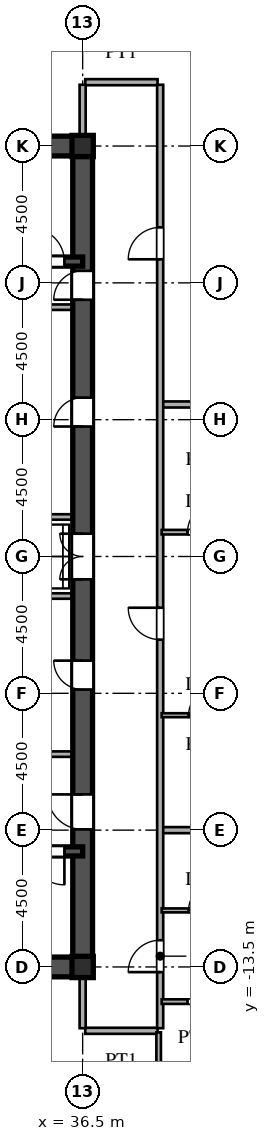
"""IFC4 building model, lengths in metres.
Left out: names, types, materials, properties, quantities, classifications, styles, units other than length and angle.
Written with IfcOpenShell. Run it as: python <this file> out.ifc"""

import sys

from ifc_helpers import new_model, si_unit, direction, frame, frame_2d, origin, origin_2d, place, context, subcontext, project, spatial, rectangle, i_section, extrude, source, transform, mapped, element, fill, save


model = new_model("IFC4")
c1 = context("Model", 3, precision=1e-05, world=origin(), true_north=direction((0.0, 1.0)))
c2 = subcontext(c1, "Body", "Model", "MODEL_VIEW")
j1 = project(units=[si_unit("LENGTHUNIT", "METRE"), si_unit("PLANEANGLEUNIT", "RADIAN")], contexts=[c1])
p1 = place(None, origin())
s1 = spatial("IfcSite", under=j1, at=p1, CompositionType="ELEMENT")
p2 = place(p1, origin())
s2 = spatial("IfcBuilding", under=s1, at=p2, CompositionType="ELEMENT")
p3 = place(p2, frame((0.0, 0.0, 132.0)))
s3 = spatial("IfcBuildingStorey", under=s2, at=p3, CompositionType="ELEMENT", Elevation=132.0)
m1 = source(origin(), c2, "Body", "SweptSolid", [
    extrude(i_section(OverallWidth=0.7, OverallDepth=0.7, WebThickness=0.028, FlangeThickness=0.045, at=origin_2d()), origin(), (0.0, 0.0, 1.0), 3.6),
])
for number, where, z_axis, x_axis in (
    (1, (36.5, -13.5, 0.0), (0.0, 0.0, 1.0), (1.0, 0.0, 0.0)),
    (2, (36.5, 13.5, 0.0), (0.0, 0.0, 1.0), (1.0, 0.0, 0.0)),
):
    element("IfcColumn", number, at=place(p3, frame(where, z_axis=z_axis, x_axis=x_axis)), inside=s3, PredefinedType="COLUMN", context=c2, shape_type="MappedRepresentation", body=[
        mapped(m1, transform((0.0, 0.0, 0.0), scale=1.0)),
    ])
for number, where, z_axis, x_axis in (
    (3, (27.5, -13.5, 0.0), (0.0, 0.0, 1.0), (1.0, 0.0, 0.0)),
    (4, (27.5, 13.5, 0.0), (0.0, 0.0, 1.0), (1.0, 0.0, 0.0)),
):
    element("IfcWall", number, at=place(p3, frame(where, z_axis=z_axis, x_axis=x_axis)), inside=s3, PredefinedType="SHEAR", context=c2, shape_type="SweptSolid", body=[
        extrude(rectangle(XDim=9.0, YDim=0.65, at=frame_2d((4.5, 0.0))), origin(), (0.0, 0.0, 1.0), 3.34),
    ])
p4 = place(p3, frame((36.5, -13.65, 0.0), z_axis=(0.0, 0.0, 1.0), x_axis=(0.0, 1.0, 0.0)))
e5 = element("IfcWall", 5, at=p4, inside=s3, PredefinedType="SHEAR", context=c2, shape_type="SweptSolid", body=[
    extrude(rectangle(XDim=7.15, YDim=0.65, at=frame_2d((3.575, 0.0))), origin(), (0.0, 0.0, 1.0), 3.34),
])
p5 = place(p4, frame((4.675, 0.0, 0.0)))
e6 = element("IfcOpeningElement", 6, at=p5, cuts=e5, PredefinedType="OPENING", context=c2, shape_type="SweptSolid", body=[
    extrude(rectangle(XDim=1.15, YDim=2.2, at=frame_2d((0.575, 1.1))), frame((0.0, 0.335, 0.0), z_axis=(0.0, -1.0, 0.0), x_axis=(1.0, 0.0, 0.0)), (0.0, 0.0, 1.0), 0.67),
])
p6 = place(p3, frame((36.5, -1.3, 0.0), z_axis=(0.0, 0.0, 1.0), x_axis=(0.0, 1.0, 0.0)))
e7 = element("IfcWall", 7, at=p6, inside=s3, PredefinedType="SHEAR", context=c2, shape_type="SweptSolid", body=[
    extrude(rectangle(XDim=2.6, YDim=0.65, at=frame_2d((1.3, 0.0))), origin(), (0.0, 0.0, 1.0), 3.34),
])
p7 = place(p6, frame((0.55, 0.0, 0.0)))
e8 = element("IfcOpeningElement", 8, at=p7, cuts=e7, PredefinedType="OPENING", context=c2, shape_type="SweptSolid", body=[
    extrude(rectangle(XDim=1.5, YDim=2.3, at=frame_2d((0.75, 1.15))), frame((0.0, 0.335, 0.0), z_axis=(0.0, -1.0, 0.0), x_axis=(1.0, 0.0, 0.0)), (0.0, 0.0, 1.0), 0.67),
])
p8 = place(p3, frame((36.5, 8.2, 0.0), z_axis=(0.0, 0.0, 1.0), x_axis=(0.0, 1.0, 0.0)))
e9 = element("IfcWall", 9, at=p8, inside=s3, PredefinedType="SHEAR", context=c2, shape_type="SweptSolid", body=[
    extrude(rectangle(XDim=5.45, YDim=0.65, at=frame_2d((2.725, 0.0))), origin(), (0.0, 0.0, 1.0), 3.34),
])
p9 = place(p8, frame((0.245, 0.0, 0.0)))
e10 = element("IfcOpeningElement", 10, at=p9, cuts=e9, PredefinedType="OPENING", context=c2, shape_type="SweptSolid", body=[
    extrude(rectangle(XDim=0.95, YDim=2.15, at=frame_2d((0.475, 1.075))), frame((0.0, 0.335, 0.0), z_axis=(0.0, -1.0, 0.0), x_axis=(1.0, 0.0, 0.0)), (0.0, 0.0, 1.0), 0.67),
])
p10 = place(p3, frame((36.5, -6.5, 0.0), z_axis=(0.0, 0.0, 1.0), x_axis=(0.0, 1.0, 0.0)))
e11 = element("IfcWall", 11, at=p10, inside=s3, PredefinedType="SHEAR", context=c2, shape_type="SweptSolid", body=[
    extrude(rectangle(XDim=5.2, YDim=0.65, at=frame_2d((2.6, 0.0))), origin(), (0.0, 0.0, 1.0), 3.34),
])
p11 = place(p10, frame((2.125, 0.0, 0.0)))
e12 = element("IfcOpeningElement", 12, at=p11, cuts=e11, PredefinedType="OPENING", context=c2, shape_type="SweptSolid", body=[
    extrude(rectangle(XDim=0.95, YDim=2.15, at=frame_2d((0.475, 1.075))), frame((0.0, 0.335, 0.0), z_axis=(0.0, -1.0, 0.0), x_axis=(1.0, 0.0, 0.0)), (0.0, 0.0, 1.0), 0.67),
])
p12 = place(p3, frame((36.5, 1.3, 0.0), z_axis=(0.0, 0.0, 1.0), x_axis=(0.0, 1.0, 0.0)))
e13 = element("IfcWall", 13, at=p12, inside=s3, PredefinedType="SHEAR", context=c2, shape_type="SweptSolid", body=[
    extrude(rectangle(XDim=6.9, YDim=0.65, at=frame_2d((3.45, 0.0))), origin(), (0.0, 0.0, 1.0), 3.34),
])
p13 = place(p12, frame((2.975, 0.0, 0.0)))
e14 = element("IfcOpeningElement", 14, at=p13, cuts=e13, PredefinedType="OPENING", context=c2, shape_type="SweptSolid", body=[
    extrude(rectangle(XDim=0.95, YDim=2.15, at=frame_2d((0.475, 1.075))), frame((0.0, 0.335, 0.0), z_axis=(0.0, -1.0, 0.0), x_axis=(1.0, 0.0, 0.0)), (0.0, 0.0, 1.0), 0.67),
])
p14 = place(p3, frame((27.5, -9.7, 0.0), z_axis=(0.0, 0.0, 1.0), x_axis=(1.0, 0.0, 0.0)))
e15 = element("IfcWall", 15, at=p14, inside=s3, PredefinedType="SHEAR", context=c2, shape_type="SweptSolid", body=[
    extrude(rectangle(XDim=9.0, YDim=0.3, at=frame_2d((4.5, 0.0))), origin(), (0.0, 0.0, 1.0), 3.34),
])
p15 = place(p14, frame((7.3, 0.0, 0.0)))
e16 = element("IfcOpeningElement", 16, at=p15, cuts=e15, PredefinedType="OPENING", context=c2, shape_type="SweptSolid", body=[
    extrude(rectangle(XDim=1.1, YDim=2.2, at=frame_2d((0.55, 1.1))), frame((0.0, 0.16, 0.0), z_axis=(0.0, -1.0, 0.0), x_axis=(1.0, 0.0, 0.0)), (0.0, 0.0, 1.0), 0.32),
])
p16 = place(p3, frame((27.5, 9.7, 0.0), z_axis=(0.0, 0.0, 1.0), x_axis=(1.0, 0.0, 0.0)))
e17 = element("IfcWall", 17, at=p16, inside=s3, PredefinedType="SHEAR", context=c2, shape_type="SweptSolid", body=[
    extrude(rectangle(XDim=9.0, YDim=0.3, at=frame_2d((4.5, 0.0))), origin(), (0.0, 0.0, 1.0), 3.34),
])
p17 = place(p16, frame((7.3, 0.0, 0.0)))
e18 = element("IfcOpeningElement", 18, at=p17, cuts=e17, PredefinedType="OPENING", context=c2, shape_type="SweptSolid", body=[
    extrude(rectangle(XDim=1.1, YDim=2.2, at=frame_2d((0.55, 1.1))), frame((0.0, 0.16, 0.0), z_axis=(0.0, -1.0, 0.0), x_axis=(1.0, 0.0, 0.0)), (0.0, 0.0, 1.0), 0.32),
])
for number, where, z_axis, x_axis in (
    (19, (30.45, -6.5, 0.0), (0.0, 0.0, 1.0), (1.0, 0.0, 0.0)),
    (20, (30.45, 8.2, 0.0), (0.0, 0.0, 1.0), (1.0, 0.0, 0.0)),
):
    element("IfcWall", number, at=place(p3, frame(where, z_axis=z_axis, x_axis=x_axis)), inside=s3, PredefinedType="PARTITIONING", context=c2, shape_type="SweptSolid", body=[
        extrude(rectangle(XDim=5.7, YDim=0.18, at=frame_2d((2.85, 0.0))), origin(), (0.0, 0.0, 1.0), 3.34),
    ])
for number, where, z_axis, x_axis in (
    (21, (33.2, -1.3, 0.0), (0.0, 0.0, 1.0), (1.0, 0.0, 0.0)),
    (22, (33.2, 1.3, 0.0), (0.0, 0.0, 1.0), (1.0, 0.0, 0.0)),
):
    element("IfcWall", number, at=place(p3, frame(where, z_axis=z_axis, x_axis=x_axis)), inside=s3, PredefinedType="PARTITIONING", context=c2, shape_type="SweptSolid", body=[
        extrude(rectangle(XDim=2.95, YDim=0.18, at=frame_2d((1.475, 0.0))), origin(), (0.0, 0.0, 1.0), 3.34),
    ])
p18 = place(p3, frame((36.585, -15.6, 0.0), z_axis=(0.0, 0.0, 1.0), x_axis=(1.0, 0.0, 0.0)))
e23 = element("IfcWall", 23, at=p18, inside=s3, PredefinedType="PARTITIONING", context=c2, shape_type="SweptSolid", body=[
    extrude(rectangle(XDim=2.38, YDim=0.2, at=frame_2d((1.19, 0.0))), origin(), (0.0, 0.0, 1.0), 3.34),
])
p19 = place(p3, frame((39.1, -14.64, 0.0), z_axis=(0.0, 0.0, 1.0), x_axis=(1.0, 0.0, 0.0)))
e24 = element("IfcWall", 24, at=p19, inside=s3, PredefinedType="PARTITIONING", context=c2, shape_type="SweptSolid", body=[
    extrude(rectangle(XDim=2.65, YDim=0.15, at=frame_2d((1.325, 0.0))), origin(), (0.0, 0.0, 1.0), 3.34),
])
p20 = place(p19, frame((0.85, 0.0, 0.0)))
e25 = element("IfcOpeningElement", 25, at=p20, cuts=e24, PredefinedType="OPENING", context=c2, shape_type="SweptSolid", body=[
    extrude(rectangle(XDim=0.95, YDim=2.15, at=frame_2d((0.475, 1.075))), frame((0.0, 0.085, 0.0), z_axis=(0.0, -1.0, 0.0), x_axis=(1.0, 0.0, 0.0)), (0.0, 0.0, 1.0), 0.17),
])
p21 = place(p3, frame((39.1, -11.64, 0.0), z_axis=(0.0, 0.0, 1.0), x_axis=(1.0, 0.0, 0.0)))
e26 = element("IfcWall", 26, at=p21, inside=s3, PredefinedType="PARTITIONING", context=c2, shape_type="SweptSolid", body=[
    extrude(rectangle(XDim=2.65, YDim=0.13, at=frame_2d((1.325, 0.0))), origin(), (0.0, 0.0, 1.0), 3.34),
])
p22 = place(p21, frame((0.885, 0.0, 0.0)))
e27 = element("IfcOpeningElement", 27, at=p22, cuts=e26, PredefinedType="OPENING", context=c2, shape_type="SweptSolid", body=[
    extrude(rectangle(XDim=0.88, YDim=2.1, at=frame_2d((0.44, 1.05))), frame((0.0, 0.075, 0.0), z_axis=(0.0, -1.0, 0.0), x_axis=(1.0, 0.0, 0.0)), (0.0, 0.0, 1.0), 0.15),
])
p23 = place(p3, frame((39.13, -9.0, 0.0), z_axis=(0.0, 0.0, 1.0), x_axis=(1.0, 0.0, 0.0)))
e28 = element("IfcWall", 28, at=p23, inside=s3, PredefinedType="PARTITIONING", context=c2, shape_type="SweptSolid", body=[
    extrude(rectangle(XDim=22.586, YDim=0.2, at=frame_2d((11.293, 0.0))), origin(), (0.0, 0.0, 1.0), 3.34),
])
p24 = place(p3, frame((39.1, -5.22, 0.0), z_axis=(0.0, 0.0, 1.0), x_axis=(1.0, 0.0, 0.0)))
e29 = element("IfcWall", 29, at=p24, inside=s3, PredefinedType="PARTITIONING", context=c2, shape_type="SweptSolid", body=[
    extrude(rectangle(XDim=2.65, YDim=0.13, at=frame_2d((1.325, 0.0))), origin(), (0.0, 0.0, 1.0), 3.34),
])
p25 = place(p24, frame((0.885, 0.0, 0.0)))
e30 = element("IfcOpeningElement", 30, at=p25, cuts=e29, PredefinedType="OPENING", context=c2, shape_type="SweptSolid", body=[
    extrude(rectangle(XDim=0.88, YDim=2.1, at=frame_2d((0.44, 1.05))), frame((0.0, 0.075, 0.0), z_axis=(0.0, -1.0, 0.0), x_axis=(1.0, 0.0, 0.0)), (0.0, 0.0, 1.0), 0.15),
])
p26 = place(p3, frame((39.1, 0.8, 0.0), z_axis=(0.0, 0.0, 1.0), x_axis=(1.0, 0.0, 0.0)))
e31 = element("IfcWall", 31, at=p26, inside=s3, PredefinedType="PARTITIONING", context=c2, shape_type="SweptSolid", body=[
    extrude(rectangle(XDim=2.65, YDim=0.15, at=frame_2d((1.325, 0.0))), origin(), (0.0, 0.0, 1.0), 3.34),
])
p27 = place(p26, frame((0.85, 0.0, 0.0)))
e32 = element("IfcOpeningElement", 32, at=p27, cuts=e31, PredefinedType="OPENING", context=c2, shape_type="SweptSolid", body=[
    extrude(rectangle(XDim=0.95, YDim=2.15, at=frame_2d((0.475, 1.075))), frame((0.0, 0.085, 0.0), z_axis=(0.0, -1.0, 0.0), x_axis=(1.0, 0.0, 0.0)), (0.0, 0.0, 1.0), 0.17),
])
p28 = place(p3, frame((39.13, 5.0, 0.0), z_axis=(0.0, 0.0, 1.0), x_axis=(1.0, 0.0, 0.0)))
e33 = element("IfcWall", 33, at=p28, inside=s3, PredefinedType="PARTITIONING", context=c2, shape_type="SweptSolid", body=[
    extrude(rectangle(XDim=30.096, YDim=0.2, at=frame_2d((15.048, 0.0))), origin(), (0.0, 0.0, 1.0), 3.34),
])
p29 = place(p3, frame((36.585, 15.6, 0.0), z_axis=(0.0, 0.0, 1.0), x_axis=(1.0, 0.0, 0.0)))
e34 = element("IfcWall", 34, at=p29, inside=s3, PredefinedType="PARTITIONING", context=c2, shape_type="SweptSolid", body=[
    extrude(rectangle(XDim=2.38, YDim=0.2, at=frame_2d((1.19, 0.0))), origin(), (0.0, 0.0, 1.0), 3.34),
])
for number, where, z_axis, x_axis in (
    (35, (36.5, -15.515, 0.0), (0.0, 0.0, 1.0), (0.0, 1.0, 0.0)),
    (36, (36.5, 13.83, 0.0), (0.0, 0.0, 1.0), (0.0, 1.0, 0.0)),
):
    element("IfcWall", number, at=place(p3, frame(where, z_axis=z_axis, x_axis=x_axis)), inside=s3, PredefinedType="PARTITIONING", context=c2, shape_type="SweptSolid", body=[
        extrude(rectangle(XDim=1.685, YDim=0.2, at=frame_2d((0.842, 0.0))), origin(), (0.0, 0.0, 1.0), 2.44),
    ])
p30 = place(p3, frame((39.0, -20.686, 0.0), z_axis=(0.0, 0.0, 1.0), x_axis=(0.0, 1.0, 0.0)))
e37 = element("IfcWall", 37, at=p30, inside=s3, PredefinedType="PARTITIONING", context=c2, shape_type="SweptSolid", body=[
    extrude(rectangle(XDim=5.036, YDim=0.15, at=frame_2d((2.518, 0.0))), origin(), (0.0, 0.0, 1.0), 3.34),
])
p31 = place(p30, frame((0.385, 0.0, 0.0)))
e38 = element("IfcOpeningElement", 38, at=p31, cuts=e37, PredefinedType="OPENING", context=c2, shape_type="SweptSolid", body=[
    extrude(rectangle(XDim=0.95, YDim=2.15, at=frame_2d((0.475, 1.075))), frame((0.0, 0.085, 0.0), z_axis=(0.0, -1.0, 0.0), x_axis=(1.0, 0.0, 0.0)), (0.0, 0.0, 1.0), 0.17),
])
p32 = place(p30, frame((2.911, 0.0, 0.0)))
e39 = element("IfcOpeningElement", 39, at=p32, cuts=e37, PredefinedType="OPENING", context=c2, shape_type="SweptSolid", body=[
    extrude(rectangle(XDim=0.95, YDim=2.15, at=frame_2d((0.475, 1.075))), frame((0.0, 0.085, 0.0), z_axis=(0.0, -1.0, 0.0), x_axis=(1.0, 0.0, 0.0)), (0.0, 0.0, 1.0), 0.17),
])
p33 = place(p3, frame((39.05, -15.515, 0.0), z_axis=(0.0, 0.0, 1.0), x_axis=(0.0, 1.0, 0.0)))
e40 = element("IfcWall", 40, at=p33, inside=s3, PredefinedType="PARTITIONING", context=c2, shape_type="SweptSolid", body=[
    extrude(rectangle(XDim=31.03, YDim=0.2, at=frame_2d((15.515, 0.0))), origin(), (0.0, 0.0, 1.0), 3.34),
])
p34 = place(p33, frame((1.845, 0.0, 0.0)))
e41 = element("IfcOpeningElement", 41, at=p34, cuts=e40, PredefinedType="OPENING", context=c2, shape_type="SweptSolid", body=[
    extrude(rectangle(XDim=1.05, YDim=2.25, at=frame_2d((0.525, 1.125))), frame((0.0, 0.11, 0.0), z_axis=(0.0, -1.0, 0.0), x_axis=(1.0, 0.0, 0.0)), (0.0, 0.0, 1.0), 0.22),
])
p35 = place(p33, frame((12.78, 0.0, 0.0)))
e42 = element("IfcOpeningElement", 42, at=p35, cuts=e40, PredefinedType="OPENING", context=c2, shape_type="SweptSolid", body=[
    extrude(rectangle(XDim=1.05, YDim=2.25, at=frame_2d((0.525, 1.125))), frame((0.0, 0.11, 0.0), z_axis=(0.0, -1.0, 0.0), x_axis=(1.0, 0.0, 0.0)), (0.0, 0.0, 1.0), 0.22),
])
p36 = place(p33, frame((25.29, 0.0, 0.0)))
e43 = element("IfcOpeningElement", 43, at=p36, cuts=e40, PredefinedType="OPENING", context=c2, shape_type="SweptSolid", body=[
    extrude(rectangle(XDim=1.05, YDim=2.25, at=frame_2d((0.525, 1.125))), frame((0.0, 0.11, 0.0), z_axis=(0.0, -1.0, 0.0), x_axis=(1.0, 0.0, 0.0)), (0.0, 0.0, 1.0), 0.22),
])
m2 = source(origin(), c2, "Body", "SweptSolid", [
    extrude(rectangle(XDim=1.15, YDim=2.2, at=frame_2d((0.575, 1.1))), frame((0.0, 0.025, 0.0), z_axis=(0.0, -1.0, 0.0), x_axis=(1.0, 0.0, 0.0)), (0.0, 0.0, 1.0), 0.05),
])
p37 = place(p5, origin())
e44 = element("IfcDoor", 44, at=p37, inside=s3, OperationType="SINGLE_SWING_RIGHT", PredefinedType="DOOR", context=c2, shape_type="MappedRepresentation", body=[
    mapped(m2, transform((0.0, 0.0, 0.0), scale=1.0)),
])
fill(e6, e44)
m3 = source(origin(), c2, "Body", "SweptSolid", [
    extrude(rectangle(XDim=1.5, YDim=2.3, at=frame_2d((0.75, 1.15))), frame((0.0, 0.025, 0.0), z_axis=(0.0, -1.0, 0.0), x_axis=(1.0, 0.0, 0.0)), (0.0, 0.0, 1.0), 0.05),
])
p38 = place(p7, origin())
e45 = element("IfcDoor", 45, at=p38, inside=s3, OperationType="DOUBLE_SWING_LEFT", PredefinedType="DOOR", context=c2, shape_type="MappedRepresentation", body=[
    mapped(m3, transform((0.0, 0.0, 0.0), scale=1.0)),
])
fill(e8, e45)
m4 = source(origin(), c2, "Body", "SweptSolid", [
    extrude(rectangle(XDim=0.95, YDim=2.15, at=frame_2d((0.475, 1.075))), frame((0.0, 0.025, 0.0), z_axis=(0.0, -1.0, 0.0), x_axis=(1.0, 0.0, 0.0)), (0.0, 0.0, 1.0), 0.05),
])
p39 = place(p9, origin())
e46 = element("IfcDoor", 46, at=p39, inside=s3, OperationType="SINGLE_SWING_LEFT", PredefinedType="DOOR", context=c2, shape_type="MappedRepresentation", body=[
    mapped(m4, transform((0.0, 0.0, 0.0), scale=1.0)),
])
fill(e10, e46)
p40 = place(p11, origin())
e47 = element("IfcDoor", 47, at=p40, inside=s3, OperationType="SINGLE_SWING_RIGHT", PredefinedType="DOOR", context=c2, shape_type="MappedRepresentation", body=[
    mapped(m4, transform((0.0, 0.0, 0.0), scale=1.0)),
])
fill(e12, e47)
p41 = place(p13, origin())
e48 = element("IfcDoor", 48, at=p41, inside=s3, OperationType="SINGLE_SWING_LEFT", PredefinedType="DOOR", context=c2, shape_type="MappedRepresentation", body=[
    mapped(m4, transform((0.0, 0.0, 0.0), scale=1.0)),
])
fill(e14, e48)
m5 = source(origin(), c2, "Body", "SweptSolid", [
    extrude(rectangle(XDim=1.1, YDim=2.2, at=frame_2d((0.55, 1.1))), frame((0.0, 0.025, 0.0), z_axis=(0.0, -1.0, 0.0), x_axis=(1.0, 0.0, 0.0)), (0.0, 0.0, 1.0), 0.05),
])
p42 = place(p15, frame((1.1, 0.0, 0.0), z_axis=(0.0, 0.0, 1.0), x_axis=(-1.0, 0.0, 0.0)))
e49 = element("IfcDoor", 49, at=p42, inside=s3, OperationType="SINGLE_SWING_RIGHT", PredefinedType="DOOR", context=c2, shape_type="MappedRepresentation", body=[
    mapped(m5, transform((0.0, 0.0, 0.0), scale=1.0)),
])
fill(e16, e49)
p43 = place(p17, origin())
e50 = element("IfcDoor", 50, at=p43, inside=s3, OperationType="SINGLE_SWING_LEFT", PredefinedType="DOOR", context=c2, shape_type="MappedRepresentation", body=[
    mapped(m5, transform((0.0, 0.0, 0.0), scale=1.0)),
])
fill(e18, e50)
m6 = source(origin(), c2, "Body", "SweptSolid", [
    extrude(rectangle(XDim=0.88, YDim=2.1, at=frame_2d((0.44, 1.05))), frame((0.0, 0.025, 0.0), z_axis=(0.0, -1.0, 0.0), x_axis=(1.0, 0.0, 0.0)), (0.0, 0.0, 1.0), 0.05),
])
p44 = place(p22, origin())
e51 = element("IfcDoor", 51, at=p44, inside=s3, OperationType="SINGLE_SWING_RIGHT", PredefinedType="DOOR", context=c2, shape_type="MappedRepresentation", body=[
    mapped(m6, transform((0.0, 0.0, 0.0), scale=1.0)),
])
fill(e27, e51)
p45 = place(p25, origin())
e52 = element("IfcDoor", 52, at=p45, inside=s3, OperationType="SINGLE_SWING_RIGHT", PredefinedType="DOOR", context=c2, shape_type="MappedRepresentation", body=[
    mapped(m6, transform((0.0, 0.0, 0.0), scale=1.0)),
])
fill(e30, e52)
m7 = source(origin(), c2, "Body", "SweptSolid", [
    extrude(rectangle(XDim=0.95, YDim=2.15, at=frame_2d((0.475, 1.075))), frame((0.0, 0.025, 0.0), z_axis=(0.0, -1.0, 0.0), x_axis=(1.0, 0.0, 0.0)), (0.0, 0.0, 1.0), 0.05),
])
p46 = place(p27, origin())
e53 = element("IfcDoor", 53, at=p46, inside=s3, OperationType="SINGLE_SWING_RIGHT", PredefinedType="DOOR", context=c2, shape_type="MappedRepresentation", body=[
    mapped(m7, transform((0.0, 0.0, 0.0), scale=1.0)),
])
fill(e32, e53)
m8 = source(origin(), c2, "Body", "SweptSolid", [
    extrude(rectangle(XDim=1.05, YDim=2.25, at=frame_2d((0.525, 1.125))), frame((0.0, 0.025, 0.0), z_axis=(0.0, -1.0, 0.0), x_axis=(1.0, 0.0, 0.0)), (0.0, 0.0, 1.0), 0.05),
])
p47 = place(p34, origin())
e54 = element("IfcDoor", 54, at=p47, inside=s3, OperationType="SINGLE_SWING_LEFT", PredefinedType="DOOR", context=c2, shape_type="MappedRepresentation", body=[
    mapped(m8, transform((0.0, 0.0, 0.0), scale=1.0)),
])
fill(e41, e54)
p48 = place(p35, origin())
e55 = element("IfcDoor", 55, at=p48, inside=s3, OperationType="SINGLE_SWING_RIGHT", PredefinedType="DOOR", context=c2, shape_type="MappedRepresentation", body=[
    mapped(m8, transform((0.0, 0.0, 0.0), scale=1.0)),
])
fill(e42, e55)
p49 = place(p36, origin())
e56 = element("IfcDoor", 56, at=p49, inside=s3, OperationType="SINGLE_SWING_LEFT", PredefinedType="DOOR", context=c2, shape_type="MappedRepresentation", body=[
    mapped(m8, transform((0.0, 0.0, 0.0), scale=1.0)),
])
fill(e43, e56)
save(model, sys.argv[1])
